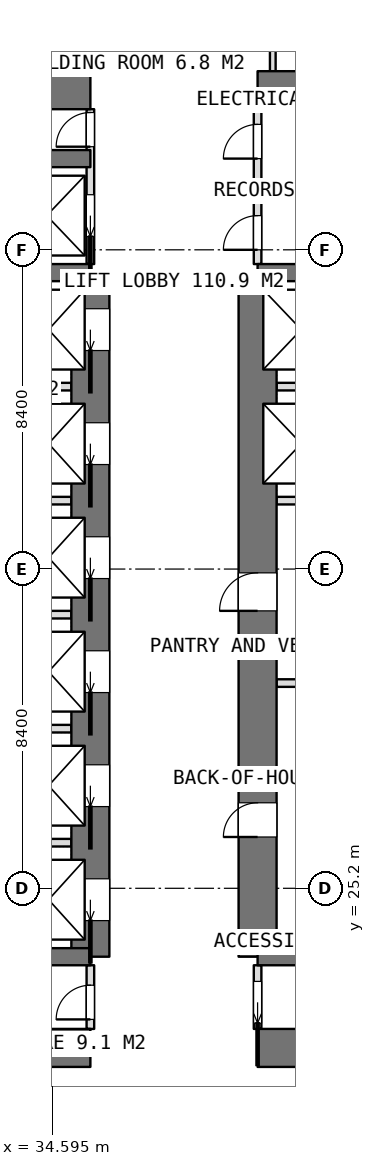
"""IFC4 building model, lengths in metres.
Left out: names, types, materials, properties, quantities, classifications, styles, units other than length and angle.
Written with IfcOpenShell. Run it as: python <this file> out.ifc"""

import sys

from ifc_helpers import new_model, si_unit, direction, frame, frame_2d, origin, place, context, subcontext, project, spatial, rectangle, extrude, element, fill, save


model = new_model("IFC4")
c1 = context("Model", 3, precision=1e-05, world=origin(), true_north=direction((0.0, 1.0)))
c2 = subcontext(c1, "Body", "Model", "MODEL_VIEW")
j1 = project(units=[si_unit("LENGTHUNIT", "METRE"), si_unit("PLANEANGLEUNIT", "RADIAN")], contexts=[c1])
p1 = place(None, origin())
s1 = spatial("IfcSite", under=j1, at=p1, CompositionType="ELEMENT")
p2 = place(p1, origin())
s2 = spatial("IfcBuilding", under=s1, at=p2, CompositionType="ELEMENT")
p3 = place(p2, frame((0.0, 0.0, 176.45)))
s3 = spatial("IfcBuildingStorey", under=s2, at=p3, CompositionType="ELEMENT", Elevation=176.45)
p4 = place(p3, frame((25.2, 21.0, 0.0), z_axis=(0.0, 0.0, 1.0), x_axis=(1.0, 0.0, 0.0)))
e1 = element("IfcWall", 1, at=p4, inside=s3, PredefinedType="SHEAR", context=c2, shape_type="SweptSolid", body=[
    extrude(rectangle(XDim=10.4, YDim=1.0, at=frame_2d((5.2, 0.0))), origin(), (0.0, 0.0, 1.0), 3.75),
])
p5 = place(p3, frame((40.0, 21.0, 0.0), z_axis=(0.0, 0.0, 1.0), x_axis=(1.0, 0.0, 0.0)))
e2 = element("IfcWall", 2, at=p5, inside=s3, PredefinedType="SHEAR", context=c2, shape_type="SweptSolid", body=[
    extrude(rectangle(XDim=10.4, YDim=1.0, at=frame_2d((5.2, 0.0))), origin(), (0.0, 0.0, 1.0), 3.75),
])
p6 = place(p3, frame((25.2, 46.2, 0.0), z_axis=(0.0, 0.0, 1.0), x_axis=(1.0, 0.0, 0.0)))
e3 = element("IfcWall", 3, at=p6, inside=s3, PredefinedType="SHEAR", context=c2, shape_type="SweptSolid", body=[
    extrude(rectangle(XDim=10.4, YDim=1.0, at=frame_2d((5.2, 0.0))), origin(), (0.0, 0.0, 1.0), 3.75),
])
p7 = place(p3, frame((40.0, 46.2, 0.0), z_axis=(0.0, 0.0, 1.0), x_axis=(1.0, 0.0, 0.0)))
e4 = element("IfcWall", 4, at=p7, inside=s3, PredefinedType="SHEAR", context=c2, shape_type="SweptSolid", body=[
    extrude(rectangle(XDim=10.4, YDim=1.0, at=frame_2d((5.2, 0.0))), origin(), (0.0, 0.0, 1.0), 3.75),
])
p8 = place(p3, frame((35.6, 23.4, 0.0), z_axis=(0.0, 0.0, 1.0), x_axis=(0.0, 1.0, 0.0)))
e5 = element("IfcWall", 5, at=p8, inside=s3, PredefinedType="SHEAR", context=c2, shape_type="SweptSolid", body=[
    extrude(rectangle(XDim=18.0, YDim=1.0, at=frame_2d((9.0, 0.0))), origin(), (0.0, 0.0, 1.0), 3.75),
])
p9 = place(p8, frame((0.95, 0.0, 0.0)))
e6 = element("IfcOpeningElement", 6, at=p9, cuts=e5, PredefinedType="OPENING", context=c2, shape_type="SweptSolid", body=[
    extrude(rectangle(XDim=1.1, YDim=2.1, at=frame_2d((0.55, 1.05))), frame((0.0, 0.51, 0.0), z_axis=(0.0, -1.0, 0.0), x_axis=(1.0, 0.0, 0.0)), (0.0, 0.0, 1.0), 1.02),
])
p10 = place(p8, frame((3.95, 0.0, 0.0)))
e7 = element("IfcOpeningElement", 7, at=p10, cuts=e5, PredefinedType="OPENING", context=c2, shape_type="SweptSolid", body=[
    extrude(rectangle(XDim=1.1, YDim=2.1, at=frame_2d((0.55, 1.05))), frame((0.0, 0.51, 0.0), z_axis=(0.0, -1.0, 0.0), x_axis=(1.0, 0.0, 0.0)), (0.0, 0.0, 1.0), 1.02),
])
p11 = place(p8, frame((6.95, 0.0, 0.0)))
e8 = element("IfcOpeningElement", 8, at=p11, cuts=e5, PredefinedType="OPENING", context=c2, shape_type="SweptSolid", body=[
    extrude(rectangle(XDim=1.1, YDim=2.1, at=frame_2d((0.55, 1.05))), frame((0.0, 0.51, 0.0), z_axis=(0.0, -1.0, 0.0), x_axis=(1.0, 0.0, 0.0)), (0.0, 0.0, 1.0), 1.02),
])
p12 = place(p8, frame((9.95, 0.0, 0.0)))
e9 = element("IfcOpeningElement", 9, at=p12, cuts=e5, PredefinedType="OPENING", context=c2, shape_type="SweptSolid", body=[
    extrude(rectangle(XDim=1.1, YDim=2.1, at=frame_2d((0.55, 1.05))), frame((0.0, 0.51, 0.0), z_axis=(0.0, -1.0, 0.0), x_axis=(1.0, 0.0, 0.0)), (0.0, 0.0, 1.0), 1.02),
])
p13 = place(p8, frame((12.95, 0.0, 0.0)))
e10 = element("IfcOpeningElement", 10, at=p13, cuts=e5, PredefinedType="OPENING", context=c2, shape_type="SweptSolid", body=[
    extrude(rectangle(XDim=1.1, YDim=2.1, at=frame_2d((0.55, 1.05))), frame((0.0, 0.51, 0.0), z_axis=(0.0, -1.0, 0.0), x_axis=(1.0, 0.0, 0.0)), (0.0, 0.0, 1.0), 1.02),
])
p14 = place(p8, frame((15.95, 0.0, 0.0)))
e11 = element("IfcOpeningElement", 11, at=p14, cuts=e5, PredefinedType="OPENING", context=c2, shape_type="SweptSolid", body=[
    extrude(rectangle(XDim=1.1, YDim=2.1, at=frame_2d((0.55, 1.05))), frame((0.0, 0.51, 0.0), z_axis=(0.0, -1.0, 0.0), x_axis=(1.0, 0.0, 0.0)), (0.0, 0.0, 1.0), 1.02),
])
p15 = place(p3, frame((40.0, 23.4, 0.0), z_axis=(0.0, 0.0, 1.0), x_axis=(0.0, 1.0, 0.0)))
e12 = element("IfcWall", 12, at=p15, inside=s3, PredefinedType="SHEAR", context=c2, shape_type="SweptSolid", body=[
    extrude(rectangle(XDim=18.0, YDim=1.0, at=frame_2d((9.0, 0.0))), origin(), (0.0, 0.0, 1.0), 3.75),
])
p16 = place(p15, frame((3.15, 0.0, 0.0)))
e13 = element("IfcOpeningElement", 13, at=p16, cuts=e12, PredefinedType="OPENING", context=c2, shape_type="SweptSolid", body=[
    extrude(rectangle(XDim=0.9, YDim=2.1, at=frame_2d((0.45, 1.05))), frame((0.0, 0.51, 0.0), z_axis=(0.0, -1.0, 0.0), x_axis=(1.0, 0.0, 0.0)), (0.0, 0.0, 1.0), 1.02),
])
p17 = place(p15, frame((9.1, 0.0, 0.0)))
e14 = element("IfcOpeningElement", 14, at=p17, cuts=e12, PredefinedType="OPENING", context=c2, shape_type="SweptSolid", body=[
    extrude(rectangle(XDim=1.0, YDim=2.1, at=frame_2d((0.5, 1.05))), frame((0.0, 0.51, 0.0), z_axis=(0.0, -1.0, 0.0), x_axis=(1.0, 0.0, 0.0)), (0.0, 0.0, 1.0), 1.02),
])
for number, where, z_axis, x_axis in (
    (15, (31.8, 23.4, 0.0), (0.0, 0.0, 1.0), (1.0, 0.0, 0.0)),
    (16, (31.8, 41.4, 0.0), (0.0, 0.0, 1.0), (1.0, 0.0, 0.0)),
    (17, (31.8, 44.4, 0.0), (0.0, 0.0, 1.0), (1.0, 0.0, 0.0)),
    (18, (40.0, 23.4, 0.0), (0.0, 0.0, 1.0), (1.0, 0.0, 0.0)),
    (19, (40.0, 41.4, 0.0), (0.0, 0.0, 1.0), (1.0, 0.0, 0.0)),
):
    element("IfcWall", number, at=place(p3, frame(where, z_axis=z_axis, x_axis=x_axis)), inside=s3, PredefinedType="SHEAR", context=c2, shape_type="SweptSolid", body=[
        extrude(rectangle(XDim=3.8, YDim=0.45, at=frame_2d((1.9, 0.0))), origin(), (0.0, 0.0, 1.0), 3.75),
    ])
for number, where, z_axis, x_axis in (
    (20, (32.025, 26.4, 0.0), (0.0, 0.0, 1.0), (1.0, 0.0, 0.0)),
    (21, (32.025, 29.4, 0.0), (0.0, 0.0, 1.0), (1.0, 0.0, 0.0)),
    (22, (32.025, 32.4, 0.0), (0.0, 0.0, 1.0), (1.0, 0.0, 0.0)),
    (23, (32.025, 35.4, 0.0), (0.0, 0.0, 1.0), (1.0, 0.0, 0.0)),
    (24, (32.025, 38.4, 0.0), (0.0, 0.0, 1.0), (1.0, 0.0, 0.0)),
):
    element("IfcWall", number, at=place(p3, frame(where, z_axis=z_axis, x_axis=x_axis)), inside=s3, PredefinedType="PARTITIONING", context=c2, shape_type="SweptSolid", body=[
        extrude(rectangle(XDim=3.075, YDim=0.2, at=frame_2d((1.538, 0.0))), origin(), (0.0, 0.0, 1.0), 3.5),
    ])
for number, where, z_axis, x_axis in (
    (25, (40.5, 35.4, 0.0), (0.0, 0.0, 1.0), (1.0, 0.0, 0.0)),
    (26, (40.5, 38.4, 0.0), (0.0, 0.0, 1.0), (1.0, 0.0, 0.0)),
):
    element("IfcWall", number, at=place(p3, frame(where, z_axis=z_axis, x_axis=x_axis)), inside=s3, PredefinedType="PARTITIONING", context=c2, shape_type="SweptSolid", body=[
        extrude(rectangle(XDim=3.075, YDim=0.2, at=frame_2d((1.538, 0.0))), origin(), (0.0, 0.0, 1.0), 3.5),
    ])
p18 = place(p3, frame((40.0, 21.5, 0.0), z_axis=(0.0, 0.0, 1.0), x_axis=(0.0, 1.0, 0.0)))
e27 = element("IfcWall", 27, at=p18, inside=s3, PredefinedType="PARTITIONING", context=c2, shape_type="SweptSolid", body=[
    extrude(rectangle(XDim=1.675, YDim=0.2, at=frame_2d((0.837, 0.0))), origin(), (0.0, 0.0, 1.0), 3.5),
])
p19 = place(p18, frame((0.15, 0.0, 0.0)))
e28 = element("IfcOpeningElement", 28, at=p19, cuts=e27, PredefinedType="OPENING", context=c2, shape_type="SweptSolid", body=[
    extrude(rectangle(XDim=1.1, YDim=2.1, at=frame_2d((0.55, 1.05))), frame((0.0, 0.11, 0.0), z_axis=(0.0, -1.0, 0.0), x_axis=(1.0, 0.0, 0.0)), (0.0, 0.0, 1.0), 0.22),
])
p20 = place(p3, frame((40.0, 41.625, 0.0), z_axis=(0.0, 0.0, 1.0), x_axis=(0.0, 1.0, 0.0)))
e29 = element("IfcWall", 29, at=p20, inside=s3, PredefinedType="PARTITIONING", context=c2, shape_type="SweptSolid", body=[
    extrude(rectangle(XDim=4.075, YDim=0.2, at=frame_2d((2.038, 0.0))), origin(), (0.0, 0.0, 1.0), 3.5),
])
p21 = place(p20, frame((2.775, 0.0, 0.0)))
e30 = element("IfcOpeningElement", 30, at=p21, cuts=e29, PredefinedType="OPENING", context=c2, shape_type="SweptSolid", body=[
    extrude(rectangle(XDim=0.9, YDim=2.1, at=frame_2d((0.45, 1.05))), frame((0.0, 0.11, 0.0), z_axis=(0.0, -1.0, 0.0), x_axis=(1.0, 0.0, 0.0)), (0.0, 0.0, 1.0), 0.22),
])
p22 = place(p20, frame((0.375, 0.0, 0.0)))
e31 = element("IfcOpeningElement", 31, at=p22, cuts=e29, PredefinedType="OPENING", context=c2, shape_type="SweptSolid", body=[
    extrude(rectangle(XDim=0.9, YDim=2.1, at=frame_2d((0.45, 1.05))), frame((0.0, 0.11, 0.0), z_axis=(0.0, -1.0, 0.0), x_axis=(1.0, 0.0, 0.0)), (0.0, 0.0, 1.0), 0.22),
])
p23 = place(p3, frame((35.6, 41.625, 0.0), z_axis=(0.0, 0.0, 1.0), x_axis=(0.0, 1.0, 0.0)))
e32 = element("IfcWall", 32, at=p23, inside=s3, PredefinedType="PARTITIONING", context=c2, shape_type="SweptSolid", body=[
    extrude(rectangle(XDim=4.075, YDim=0.2, at=frame_2d((2.038, 0.0))), origin(), (0.0, 0.0, 1.0), 3.5),
])
p24 = place(p23, frame((3.088, 0.0, 0.0)))
e33 = element("IfcOpeningElement", 33, at=p24, cuts=e32, PredefinedType="OPENING", context=c2, shape_type="SweptSolid", body=[
    extrude(rectangle(XDim=0.9, YDim=2.1, at=frame_2d((0.45, 1.05))), frame((0.0, 0.11, 0.0), z_axis=(0.0, -1.0, 0.0), x_axis=(1.0, 0.0, 0.0)), (0.0, 0.0, 1.0), 0.22),
])
p25 = place(p23, frame((0.725, 0.0, 0.0)))
e34 = element("IfcOpeningElement", 34, at=p25, cuts=e32, PredefinedType="OPENING", context=c2, shape_type="SweptSolid", body=[
    extrude(rectangle(XDim=1.1, YDim=2.1, at=frame_2d((0.55, 1.05))), frame((0.0, 0.11, 0.0), z_axis=(0.0, -1.0, 0.0), x_axis=(1.0, 0.0, 0.0)), (0.0, 0.0, 1.0), 0.22),
])
p26 = place(p3, frame((35.6, 21.5, 0.0), z_axis=(0.0, 0.0, 1.0), x_axis=(0.0, 1.0, 0.0)))
e35 = element("IfcWall", 35, at=p26, inside=s3, PredefinedType="PARTITIONING", context=c2, shape_type="SweptSolid", body=[
    extrude(rectangle(XDim=1.675, YDim=0.2, at=frame_2d((0.837, 0.0))), origin(), (0.0, 0.0, 1.0), 3.5),
])
p27 = place(p26, frame((0.25, 0.0, 0.0)))
e36 = element("IfcOpeningElement", 36, at=p27, cuts=e35, PredefinedType="OPENING", context=c2, shape_type="SweptSolid", body=[
    extrude(rectangle(XDim=0.9, YDim=2.1, at=frame_2d((0.45, 1.05))), frame((0.0, 0.11, 0.0), z_axis=(0.0, -1.0, 0.0), x_axis=(1.0, 0.0, 0.0)), (0.0, 0.0, 1.0), 0.22),
])
p28 = place(p3, frame((40.5, 30.6, 0.0), z_axis=(0.0, 0.0, 1.0), x_axis=(1.0, 0.0, 0.0)))
e37 = element("IfcWall", 37, at=p28, inside=s3, PredefinedType="PARTITIONING", context=c2, shape_type="SweptSolid", body=[
    extrude(rectangle(XDim=3.075, YDim=0.2, at=frame_2d((1.538, 0.0))), origin(), (0.0, 0.0, 1.0), 3.5),
])
p29 = place(p3, frame((40.0, 43.5, 0.0), z_axis=(0.0, 0.0, 1.0), x_axis=(1.0, 0.0, 0.0)))
e38 = element("IfcWall", 38, at=p29, inside=s3, PredefinedType="PARTITIONING", context=c2, shape_type="SweptSolid", body=[
    extrude(rectangle(XDim=3.575, YDim=0.2, at=frame_2d((1.788, 0.0))), origin(), (0.0, 0.0, 1.0), 3.5),
])
for number, where, z_axis, x_axis in (
    (39, (40.4, 46.7, 0.0), (0.0, 0.0, 1.0), (0.0, 1.0, 0.0)),
    (40, (35.2, 46.7, 0.0), (0.0, 0.0, 1.0), (0.0, 1.0, 0.0)),
):
    element("IfcWall", number, at=place(p3, frame(where, z_axis=z_axis, x_axis=x_axis)), inside=s3, PredefinedType="PARTITIONING", context=c2, shape_type="SweptSolid", body=[
        extrude(rectangle(XDim=2.625, YDim=0.15, at=frame_2d((1.312, 0.0))), origin(), (0.0, 0.0, 1.0), 3.5),
    ])
p30 = place(p19, origin())
e41 = element("IfcDoor", 41, at=p30, inside=s3, OperationType="SLIDING_TO_LEFT", PredefinedType="DOOR", context=c2, shape_type="SweptSolid", body=[
    extrude(rectangle(XDim=1.1, YDim=2.1, at=frame_2d((0.55, 1.05))), frame((0.0, 0.025, 0.0), z_axis=(0.0, -1.0, 0.0), x_axis=(1.0, 0.0, 0.0)), (0.0, 0.0, 1.0), 0.05),
])
fill(e28, e41)
p31 = place(p27, origin())
e42 = element("IfcDoor", 42, at=p31, inside=s3, OperationType="SINGLE_SWING_LEFT", PredefinedType="DOOR", context=c2, shape_type="SweptSolid", body=[
    extrude(rectangle(XDim=0.9, YDim=2.1, at=frame_2d((0.45, 1.05))), frame((0.0, 0.025, 0.0), z_axis=(0.0, -1.0, 0.0), x_axis=(1.0, 0.0, 0.0)), (0.0, 0.0, 1.0), 0.05),
])
fill(e36, e42)
p32 = place(p21, origin())
e43 = element("IfcDoor", 43, at=p32, inside=s3, OperationType="SINGLE_SWING_LEFT", PredefinedType="DOOR", context=c2, shape_type="SweptSolid", body=[
    extrude(rectangle(XDim=0.9, YDim=2.1, at=frame_2d((0.45, 1.05))), frame((0.0, 0.025, 0.0), z_axis=(0.0, -1.0, 0.0), x_axis=(1.0, 0.0, 0.0)), (0.0, 0.0, 1.0), 0.05),
])
fill(e30, e43)
p33 = place(p22, origin())
e44 = element("IfcDoor", 44, at=p33, inside=s3, OperationType="SINGLE_SWING_LEFT", PredefinedType="DOOR", context=c2, shape_type="SweptSolid", body=[
    extrude(rectangle(XDim=0.9, YDim=2.1, at=frame_2d((0.45, 1.05))), frame((0.0, 0.025, 0.0), z_axis=(0.0, -1.0, 0.0), x_axis=(1.0, 0.0, 0.0)), (0.0, 0.0, 1.0), 0.05),
])
fill(e31, e44)
p34 = place(p16, origin())
e45 = element("IfcDoor", 45, at=p34, inside=s3, OperationType="SINGLE_SWING_LEFT", PredefinedType="DOOR", context=c2, shape_type="SweptSolid", body=[
    extrude(rectangle(XDim=0.9, YDim=2.1, at=frame_2d((0.45, 1.05))), frame((0.0, 0.025, 0.0), z_axis=(0.0, -1.0, 0.0), x_axis=(1.0, 0.0, 0.0)), (0.0, 0.0, 1.0), 0.05),
])
fill(e13, e45)
p35 = place(p17, origin())
e46 = element("IfcDoor", 46, at=p35, inside=s3, OperationType="SINGLE_SWING_LEFT", PredefinedType="DOOR", context=c2, shape_type="SweptSolid", body=[
    extrude(rectangle(XDim=1.0, YDim=2.1, at=frame_2d((0.5, 1.05))), frame((0.0, 0.025, 0.0), z_axis=(0.0, -1.0, 0.0), x_axis=(1.0, 0.0, 0.0)), (0.0, 0.0, 1.0), 0.05),
])
fill(e14, e46)
p36 = place(p24, origin())
e47 = element("IfcDoor", 47, at=p36, inside=s3, OperationType="SINGLE_SWING_LEFT", PredefinedType="DOOR", context=c2, shape_type="SweptSolid", body=[
    extrude(rectangle(XDim=0.9, YDim=2.1, at=frame_2d((0.45, 1.05))), frame((0.0, 0.025, 0.0), z_axis=(0.0, -1.0, 0.0), x_axis=(1.0, 0.0, 0.0)), (0.0, 0.0, 1.0), 0.05),
])
fill(e33, e47)
p37 = place(p9, origin())
e48 = element("IfcDoor", 48, at=p37, inside=s3, OperationType="SLIDING_TO_LEFT", PredefinedType="USERDEFINED", context=c2, shape_type="SweptSolid", body=[
    extrude(rectangle(XDim=1.1, YDim=2.1, at=frame_2d((0.55, 1.05))), frame((0.0, 0.025, 0.0), z_axis=(0.0, -1.0, 0.0), x_axis=(1.0, 0.0, 0.0)), (0.0, 0.0, 1.0), 0.05),
])
fill(e6, e48)
p38 = place(p10, origin())
e49 = element("IfcDoor", 49, at=p38, inside=s3, OperationType="SLIDING_TO_LEFT", PredefinedType="USERDEFINED", context=c2, shape_type="SweptSolid", body=[
    extrude(rectangle(XDim=1.1, YDim=2.1, at=frame_2d((0.55, 1.05))), frame((0.0, 0.025, 0.0), z_axis=(0.0, -1.0, 0.0), x_axis=(1.0, 0.0, 0.0)), (0.0, 0.0, 1.0), 0.05),
])
fill(e7, e49)
p39 = place(p11, origin())
e50 = element("IfcDoor", 50, at=p39, inside=s3, OperationType="SLIDING_TO_LEFT", PredefinedType="USERDEFINED", context=c2, shape_type="SweptSolid", body=[
    extrude(rectangle(XDim=1.1, YDim=2.1, at=frame_2d((0.55, 1.05))), frame((0.0, 0.025, 0.0), z_axis=(0.0, -1.0, 0.0), x_axis=(1.0, 0.0, 0.0)), (0.0, 0.0, 1.0), 0.05),
])
fill(e8, e50)
p40 = place(p12, origin())
e51 = element("IfcDoor", 51, at=p40, inside=s3, OperationType="SLIDING_TO_LEFT", PredefinedType="USERDEFINED", context=c2, shape_type="SweptSolid", body=[
    extrude(rectangle(XDim=1.1, YDim=2.1, at=frame_2d((0.55, 1.05))), frame((0.0, 0.025, 0.0), z_axis=(0.0, -1.0, 0.0), x_axis=(1.0, 0.0, 0.0)), (0.0, 0.0, 1.0), 0.05),
])
fill(e9, e51)
p41 = place(p13, origin())
e52 = element("IfcDoor", 52, at=p41, inside=s3, OperationType="SLIDING_TO_LEFT", PredefinedType="USERDEFINED", context=c2, shape_type="SweptSolid", body=[
    extrude(rectangle(XDim=1.1, YDim=2.1, at=frame_2d((0.55, 1.05))), frame((0.0, 0.025, 0.0), z_axis=(0.0, -1.0, 0.0), x_axis=(1.0, 0.0, 0.0)), (0.0, 0.0, 1.0), 0.05),
])
fill(e10, e52)
p42 = place(p14, origin())
e53 = element("IfcDoor", 53, at=p42, inside=s3, OperationType="SLIDING_TO_LEFT", PredefinedType="USERDEFINED", context=c2, shape_type="SweptSolid", body=[
    extrude(rectangle(XDim=1.1, YDim=2.1, at=frame_2d((0.55, 1.05))), frame((0.0, 0.025, 0.0), z_axis=(0.0, -1.0, 0.0), x_axis=(1.0, 0.0, 0.0)), (0.0, 0.0, 1.0), 0.05),
])
fill(e11, e53)
p43 = place(p25, origin())
e54 = element("IfcDoor", 54, at=p43, inside=s3, OperationType="SLIDING_TO_LEFT", PredefinedType="USERDEFINED", context=c2, shape_type="SweptSolid", body=[
    extrude(rectangle(XDim=1.1, YDim=2.1, at=frame_2d((0.55, 1.05))), frame((0.0, 0.025, 0.0), z_axis=(0.0, -1.0, 0.0), x_axis=(1.0, 0.0, 0.0)), (0.0, 0.0, 1.0), 0.05),
])
fill(e34, e54)
save(model, sys.argv[1])
